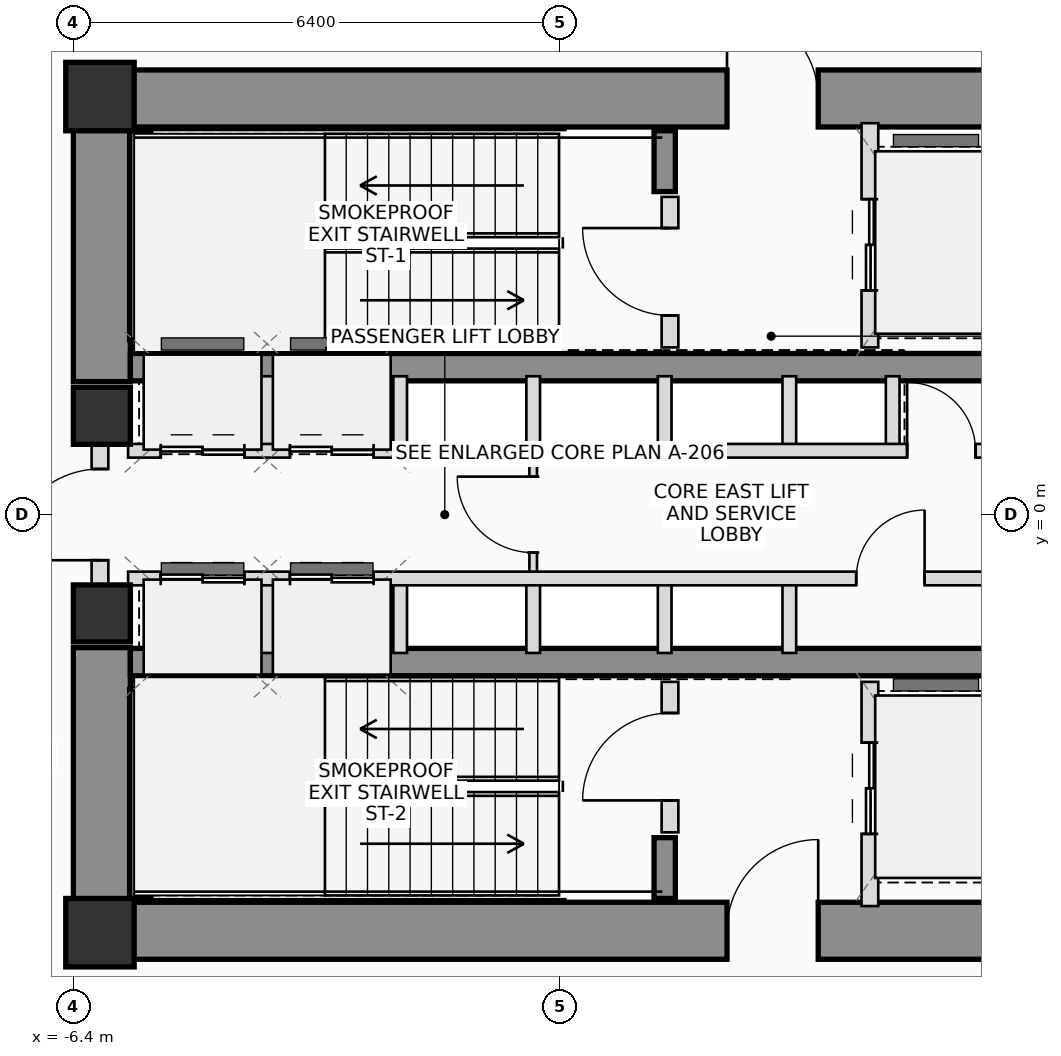
"""IFC4 building model, lengths in metres.
Left out: names, types, materials, properties, quantities, classifications, styles, units other than length and angle.
Written with IfcOpenShell. Run it as: python <this file> out.ifc"""

import sys

from ifc_helpers import new_model, si_unit, direction, frame, frame_2d, origin, origin_2d, place, context, subcontext, project, spatial, rectangle, extrude, source, transform, mapped, element, fill, save


model = new_model("IFC4")
c1 = context("Model", 3, precision=1e-05, world=origin(), true_north=direction((0.0, 1.0)))
c2 = subcontext(c1, "Body", "Model", "MODEL_VIEW")
j1 = project(units=[si_unit("LENGTHUNIT", "METRE"), si_unit("PLANEANGLEUNIT", "RADIAN")], contexts=[c1])
p1 = place(None, origin())
s1 = spatial("IfcSite", under=j1, at=p1, CompositionType="ELEMENT")
p2 = place(p1, origin())
s2 = spatial("IfcBuilding", under=s1, at=p2, CompositionType="ELEMENT")
p3 = place(p2, frame((0.0, 0.0, 54.8)))
s3 = spatial("IfcBuildingStorey", under=s2, at=p3, CompositionType="ELEMENT", Elevation=54.8)
m1 = source(origin(), c2, "Body", "SweptSolid", [
    extrude(rectangle(XDim=0.9, YDim=0.9, at=origin_2d()), origin(), (0.0, 0.0, 1.0), 3.75),
])
for number, where, z_axis, x_axis in (
    (1, (-6.05, -5.5, 0.0), (0.0, 0.0, 1.0), (1.0, 0.0, 0.0)),
    (2, (-6.05, 5.5, 0.0), (0.0, 0.0, 1.0), (1.0, 0.0, 0.0)),
):
    element("IfcColumn", number, at=place(p3, frame(where, z_axis=z_axis, x_axis=x_axis)), inside=s3, PredefinedType="COLUMN", context=c2, shape_type="MappedRepresentation", body=[
        mapped(m1, transform((0.0, 0.0, 0.0), scale=1.0)),
    ])
p4 = place(p3, frame((-6.4, 5.475, 0.0), z_axis=(0.0, 0.0, 1.0), x_axis=(1.0, 0.0, 0.0)))
e3 = element("IfcWall", 3, at=p4, inside=s3, PredefinedType="SHEAR", context=c2, shape_type="SweptSolid", body=[
    extrude(rectangle(XDim=12.8, YDim=0.75, at=frame_2d((6.4, 0.0))), origin(), (0.0, 0.0, 1.0), 3.75),
])
p5 = place(p4, frame((8.6, 0.0, 0.0)))
e4 = element("IfcOpeningElement", 4, at=p5, cuts=e3, PredefinedType="OPENING", context=c2, shape_type="SweptSolid", body=[
    extrude(rectangle(XDim=1.2, YDim=2.2, at=frame_2d((0.6, 1.1))), frame((0.0, 0.385, 0.0), z_axis=(0.0, -1.0, 0.0), x_axis=(1.0, 0.0, 0.0)), (0.0, 0.0, 1.0), 0.77),
])
p6 = place(p3, frame((-6.4, -5.475, 0.0), z_axis=(0.0, 0.0, 1.0), x_axis=(1.0, 0.0, 0.0)))
e5 = element("IfcWall", 5, at=p6, inside=s3, PredefinedType="SHEAR", context=c2, shape_type="SweptSolid", body=[
    extrude(rectangle(XDim=12.8, YDim=0.75, at=frame_2d((6.4, 0.0))), origin(), (0.0, 0.0, 1.0), 3.75),
])
p7 = place(p6, frame((8.6, 0.0, 0.0)))
e6 = element("IfcOpeningElement", 6, at=p7, cuts=e5, PredefinedType="OPENING", context=c2, shape_type="SweptSolid", body=[
    extrude(rectangle(XDim=1.2, YDim=2.2, at=frame_2d((0.6, 1.1))), frame((0.0, 0.385, 0.0), z_axis=(0.0, -1.0, 0.0), x_axis=(1.0, 0.0, 0.0)), (0.0, 0.0, 1.0), 0.77),
])
for number, where, z_axis, x_axis in (
    (7, (-6.025, -5.1, 0.0), (0.0, 0.0, 1.0), (0.0, 1.0, 0.0)),
    (8, (-6.025, 1.75, 0.0), (0.0, 0.0, 1.0), (0.0, 1.0, 0.0)),
):
    element("IfcWall", number, at=place(p3, frame(where, z_axis=z_axis, x_axis=x_axis)), inside=s3, PredefinedType="SHEAR", context=c2, shape_type="SweptSolid", body=[
        extrude(rectangle(XDim=3.35, YDim=0.75, at=frame_2d((1.675, 0.0))), origin(), (0.0, 0.0, 1.0), 3.75),
    ])
for number, where, z_axis, x_axis in (
    (9, (-5.65, 1.94, 0.0), (0.0, 0.0, 1.0), (1.0, 0.0, 0.0)),
    (10, (-5.65, -1.94, 0.0), (0.0, 0.0, 1.0), (1.0, 0.0, 0.0)),
):
    element("IfcWall", number, at=place(p3, frame(where, z_axis=z_axis, x_axis=x_axis)), inside=s3, PredefinedType="SHEAR", context=c2, shape_type="SweptSolid", body=[
        extrude(rectangle(XDim=11.3, YDim=0.36, at=frame_2d((5.65, 0.0))), origin(), (0.0, 0.0, 1.0), 3.75),
    ])
p8 = place(p3, frame((-5.52, 2.3, 0.0), z_axis=(0.0, 0.0, 1.0), x_axis=(0.0, 1.0, 0.0)))
e11 = element("IfcWall", 11, at=p8, inside=s3, PredefinedType="SHEAR", context=c2, shape_type="SweptSolid", body=[
    extrude(rectangle(XDim=2.75, YDim=0.28, at=frame_2d((1.375, 0.0))), origin(), (0.0, 0.0, 1.0), 3.75),
])
p9 = place(p3, frame((1.38, 4.25, 0.0), z_axis=(0.0, 0.0, 1.0), x_axis=(0.0, 1.0, 0.0)))
e12 = element("IfcWall", 12, at=p9, inside=s3, PredefinedType="SHEAR", context=c2, shape_type="SweptSolid", body=[
    extrude(rectangle(XDim=0.8, YDim=0.28, at=frame_2d((0.4, 0.0))), origin(), (0.0, 0.0, 1.0), 3.75),
])
p10 = place(p3, frame((-5.52, -5.05, 0.0), z_axis=(0.0, 0.0, 1.0), x_axis=(0.0, 1.0, 0.0)))
e13 = element("IfcWall", 13, at=p10, inside=s3, PredefinedType="SHEAR", context=c2, shape_type="SweptSolid", body=[
    extrude(rectangle(XDim=2.75, YDim=0.28, at=frame_2d((1.375, 0.0))), origin(), (0.0, 0.0, 1.0), 3.75),
])
p11 = place(p3, frame((1.38, -5.05, 0.0), z_axis=(0.0, 0.0, 1.0), x_axis=(0.0, 1.0, 0.0)))
e14 = element("IfcWall", 14, at=p11, inside=s3, PredefinedType="SHEAR", context=c2, shape_type="SweptSolid", body=[
    extrude(rectangle(XDim=0.8, YDim=0.28, at=frame_2d((0.4, 0.0))), origin(), (0.0, 0.0, 1.0), 3.75),
])
m2 = source(origin(), c2, "Body", "SweptSolid", [
    extrude(rectangle(XDim=0.75, YDim=0.75, at=origin_2d()), origin(), (0.0, 0.0, 1.0), 3.75),
])
for number, where, z_axis, x_axis in (
    (15, (-6.025, -1.3, 0.0), (0.0, 0.0, 1.0), (1.0, 0.0, 0.0)),
    (16, (-6.025, 1.3, 0.0), (0.0, 0.0, 1.0), (1.0, 0.0, 0.0)),
):
    element("IfcColumn", number, at=place(p3, frame(where, z_axis=z_axis, x_axis=x_axis)), inside=s3, PredefinedType="COLUMN", context=c2, shape_type="MappedRepresentation", body=[
        mapped(m2, transform((0.0, 0.0, 0.0), scale=1.0)),
    ])
p12 = place(p3, frame((-6.05, -0.95, 0.0), z_axis=(0.0, 0.0, 1.0), x_axis=(0.0, 1.0, 0.0)))
e17 = element("IfcWall", 17, at=p12, inside=s3, PredefinedType="PLUMBINGWALL", context=c2, shape_type="SweptSolid", body=[
    extrude(rectangle(XDim=1.9, YDim=0.22, at=frame_2d((0.95, 0.0))), origin(), (0.0, 0.0, 1.0), 2.525),
])
p13 = place(p12, frame((0.35, 0.0, 0.0)))
e18 = element("IfcOpeningElement", 18, at=p13, cuts=e17, PredefinedType="OPENING", context=c2, shape_type="SweptSolid", body=[
    extrude(rectangle(XDim=1.2, YDim=2.2, at=frame_2d((0.6, 1.1))), frame((0.0, 0.12, 0.0), z_axis=(0.0, -1.0, 0.0), x_axis=(1.0, 0.0, 0.0)), (0.0, 0.0, 1.0), 0.24),
])
p14 = place(p3, frame((1.45, 2.2, 0.0), z_axis=(0.0, 0.0, 1.0), x_axis=(0.0, 1.0, 0.0)))
e19 = element("IfcWall", 19, at=p14, inside=s3, PredefinedType="PLUMBINGWALL", context=c2, shape_type="SweptSolid", body=[
    extrude(rectangle(XDim=1.98, YDim=0.22, at=frame_2d((0.99, 0.0))), origin(), (0.0, 0.0, 1.0), 3.545),
])
p15 = place(p14, frame((0.42, 0.0, 0.0)))
e20 = element("IfcOpeningElement", 20, at=p15, cuts=e19, PredefinedType="OPENING", context=c2, shape_type="SweptSolid", body=[
    extrude(rectangle(XDim=1.15, YDim=2.15, at=frame_2d((0.575, 1.075))), frame((0.0, 0.12, 0.0), z_axis=(0.0, -1.0, 0.0), x_axis=(1.0, 0.0, 0.0)), (0.0, 0.0, 1.0), 0.24),
])
p16 = place(p3, frame((4.08, 2.2, 0.0), z_axis=(0.0, 0.0, 1.0), x_axis=(0.0, 1.0, 0.0)))
e21 = element("IfcWall", 21, at=p16, inside=s3, PredefinedType="PLUMBINGWALL", context=c2, shape_type="SweptSolid", body=[
    extrude(rectangle(XDim=2.95, YDim=0.22, at=frame_2d((1.475, 0.0))), origin(), (0.0, 0.0, 1.0), 3.545),
])
p17 = place(p16, frame((0.75, 0.0, 0.0)))
e22 = element("IfcOpeningElement", 22, at=p17, cuts=e21, PredefinedType="OPENING", context=c2, shape_type="SweptSolid", body=[
    extrude(rectangle(XDim=1.2, YDim=2.25, at=frame_2d((0.6, 1.125))), frame((0.0, 0.12, 0.0), z_axis=(0.0, -1.0, 0.0), x_axis=(1.0, 0.0, 0.0)), (0.0, 0.0, 1.0), 0.24),
])
p18 = place(p3, frame((1.45, -4.18, 0.0), z_axis=(0.0, 0.0, 1.0), x_axis=(0.0, 1.0, 0.0)))
e23 = element("IfcWall", 23, at=p18, inside=s3, PredefinedType="PLUMBINGWALL", context=c2, shape_type="SweptSolid", body=[
    extrude(rectangle(XDim=1.98, YDim=0.22, at=frame_2d((0.99, 0.0))), origin(), (0.0, 0.0, 1.0), 3.545),
])
p19 = place(p18, frame((0.42, 0.0, 0.0)))
e24 = element("IfcOpeningElement", 24, at=p19, cuts=e23, PredefinedType="OPENING", context=c2, shape_type="SweptSolid", body=[
    extrude(rectangle(XDim=1.15, YDim=2.15, at=frame_2d((0.575, 1.075))), frame((0.0, 0.12, 0.0), z_axis=(0.0, -1.0, 0.0), x_axis=(1.0, 0.0, 0.0)), (0.0, 0.0, 1.0), 0.24),
])
p20 = place(p3, frame((4.08, -5.15, 0.0), z_axis=(0.0, 0.0, 1.0), x_axis=(0.0, 1.0, 0.0)))
e25 = element("IfcWall", 25, at=p20, inside=s3, PredefinedType="PLUMBINGWALL", context=c2, shape_type="SweptSolid", body=[
    extrude(rectangle(XDim=2.95, YDim=0.22, at=frame_2d((1.475, 0.0))), origin(), (0.0, 0.0, 1.0), 3.545),
])
p21 = place(p20, frame((0.95, 0.0, 0.0)))
e26 = element("IfcOpeningElement", 26, at=p21, cuts=e25, PredefinedType="OPENING", context=c2, shape_type="SweptSolid", body=[
    extrude(rectangle(XDim=1.2, YDim=2.25, at=frame_2d((0.6, 1.125))), frame((0.0, 0.12, 0.0), z_axis=(0.0, -1.0, 0.0), x_axis=(1.0, 0.0, 0.0)), (0.0, 0.0, 1.0), 0.24),
])
p22 = place(p3, frame((-0.35, -0.84, 0.0), z_axis=(0.0, 0.0, 1.0), x_axis=(0.0, 1.0, 0.0)))
e27 = element("IfcWall", 27, at=p22, inside=s3, PredefinedType="PARTITIONING", context=c2, shape_type="SweptSolid", body=[
    extrude(rectangle(XDim=1.68, YDim=0.1, at=frame_2d((0.84, 0.0))), origin(), (0.0, 0.0, 1.0), 3.545),
])
p23 = place(p22, frame((0.34, 0.0, 0.0)))
e28 = element("IfcOpeningElement", 28, at=p23, cuts=e27, PredefinedType="OPENING", context=c2, shape_type="SweptSolid", body=[
    extrude(rectangle(XDim=1.0, YDim=2.25, at=frame_2d((0.5, 1.125))), frame((0.0, 0.06, 0.0), z_axis=(0.0, -1.0, 0.0), x_axis=(1.0, 0.0, 0.0)), (0.0, 0.0, 1.0), 0.12),
])
for number, where, z_axis, x_axis in (
    (29, (-3.85, 0.84, 0.0), (0.0, 0.0, 1.0), (0.0, 1.0, 0.0)),
    (30, (-3.85, -1.82, 0.0), (0.0, 0.0, 1.0), (0.0, 1.0, 0.0)),
    (31, (-2.1, 0.84, 0.0), (0.0, 0.0, 1.0), (0.0, 1.0, 0.0)),
    (32, (-2.1, -1.82, 0.0), (0.0, 0.0, 1.0), (0.0, 1.0, 0.0)),
    (33, (-0.35, 0.84, 0.0), (0.0, 0.0, 1.0), (0.0, 1.0, 0.0)),
    (34, (-0.35, -1.82, 0.0), (0.0, 0.0, 1.0), (0.0, 1.0, 0.0)),
    (35, (1.38, 0.84, 0.0), (0.0, 0.0, 1.0), (0.0, 1.0, 0.0)),
    (36, (1.38, -1.82, 0.0), (0.0, 0.0, 1.0), (0.0, 1.0, 0.0)),
    (37, (3.02, 0.84, 0.0), (0.0, 0.0, 1.0), (0.0, 1.0, 0.0)),
    (38, (4.38, 0.84, 0.0), (0.0, 0.0, 1.0), (0.0, 1.0, 0.0)),
    (39, (3.02, -1.82, 0.0), (0.0, 0.0, 1.0), (0.0, 1.0, 0.0)),
):
    element("IfcWall", number, at=place(p3, frame(where, z_axis=z_axis, x_axis=x_axis)), inside=s3, PredefinedType="PLUMBINGWALL", context=c2, shape_type="SweptSolid", body=[
        extrude(rectangle(XDim=0.98, YDim=0.18, at=frame_2d((0.49, 0.0))), origin(), (0.0, 0.0, 1.0), 3.545),
    ])
p24 = place(p3, frame((-5.68, 0.84, 0.0), z_axis=(0.0, 0.0, 1.0), x_axis=(1.0, 0.0, 0.0)))
e40 = element("IfcWall", 40, at=p24, inside=s3, PredefinedType="PLUMBINGWALL", context=c2, shape_type="SweptSolid", body=[
    extrude(rectangle(XDim=11.33, YDim=0.18, at=frame_2d((5.665, 0.0))), origin(), (0.0, 0.0, 1.0), 3.545),
])
p25 = place(p24, frame((0.43, 0.0, 0.0)))
e41 = element("IfcOpeningElement", 41, at=p25, cuts=e40, PredefinedType="OPENING", context=c2, shape_type="SweptSolid", body=[
    extrude(rectangle(XDim=1.1, YDim=2.2, at=frame_2d((0.55, 1.1))), frame((0.0, 0.1, 0.0), z_axis=(0.0, -1.0, 0.0), x_axis=(1.0, 0.0, 0.0)), (0.0, 0.0, 1.0), 0.2),
])
p26 = place(p24, frame((2.13, 0.0, 0.0)))
e42 = element("IfcOpeningElement", 42, at=p26, cuts=e40, PredefinedType="OPENING", context=c2, shape_type="SweptSolid", body=[
    extrude(rectangle(XDim=1.1, YDim=2.2, at=frame_2d((0.55, 1.1))), frame((0.0, 0.1, 0.0), z_axis=(0.0, -1.0, 0.0), x_axis=(1.0, 0.0, 0.0)), (0.0, 0.0, 1.0), 0.2),
])
p27 = place(p24, frame((10.25, 0.0, 0.0)))
e43 = element("IfcOpeningElement", 43, at=p27, cuts=e40, PredefinedType="OPENING", context=c2, shape_type="SweptSolid", body=[
    extrude(rectangle(XDim=0.9, YDim=2.05, at=frame_2d((0.45, 1.025))), frame((0.0, 0.1, 0.0), z_axis=(0.0, -1.0, 0.0), x_axis=(1.0, 0.0, 0.0)), (0.0, 0.0, 1.0), 0.2),
])
p28 = place(p3, frame((-5.68, -0.84, 0.0), z_axis=(0.0, 0.0, 1.0), x_axis=(1.0, 0.0, 0.0)))
e44 = element("IfcWall", 44, at=p28, inside=s3, PredefinedType="PLUMBINGWALL", context=c2, shape_type="SweptSolid", body=[
    extrude(rectangle(XDim=11.33, YDim=0.18, at=frame_2d((5.665, 0.0))), origin(), (0.0, 0.0, 1.0), 3.545),
])
p29 = place(p28, frame((0.43, 0.0, 0.0)))
e45 = element("IfcOpeningElement", 45, at=p29, cuts=e44, PredefinedType="OPENING", context=c2, shape_type="SweptSolid", body=[
    extrude(rectangle(XDim=1.1, YDim=2.2, at=frame_2d((0.55, 1.1))), frame((0.0, 0.1, 0.0), z_axis=(0.0, -1.0, 0.0), x_axis=(1.0, 0.0, 0.0)), (0.0, 0.0, 1.0), 0.2),
])
p30 = place(p28, frame((2.13, 0.0, 0.0)))
e46 = element("IfcOpeningElement", 46, at=p30, cuts=e44, PredefinedType="OPENING", context=c2, shape_type="SweptSolid", body=[
    extrude(rectangle(XDim=1.1, YDim=2.2, at=frame_2d((0.55, 1.1))), frame((0.0, 0.1, 0.0), z_axis=(0.0, -1.0, 0.0), x_axis=(1.0, 0.0, 0.0)), (0.0, 0.0, 1.0), 0.2),
])
p31 = place(p28, frame((9.58, 0.0, 0.0)))
e47 = element("IfcOpeningElement", 47, at=p31, cuts=e44, PredefinedType="OPENING", context=c2, shape_type="SweptSolid", body=[
    extrude(rectangle(XDim=0.9, YDim=2.05, at=frame_2d((0.45, 1.025))), frame((0.0, 0.1, 0.0), z_axis=(0.0, -1.0, 0.0), x_axis=(1.0, 0.0, 0.0)), (0.0, 0.0, 1.0), 0.2),
])
p32 = place(p5, origin())
e48 = element("IfcDoor", 48, at=p32, inside=s3, OperationType="SINGLE_SWING_LEFT", PredefinedType="DOOR", context=c2, shape_type="SweptSolid", body=[
    extrude(rectangle(XDim=1.2, YDim=2.2, at=frame_2d((0.6, 1.1))), frame((0.0, 0.025, 0.0), z_axis=(0.0, -1.0, 0.0), x_axis=(1.0, 0.0, 0.0)), (0.0, 0.0, 1.0), 0.05),
])
fill(e4, e48)
p33 = place(p7, origin())
e49 = element("IfcDoor", 49, at=p33, inside=s3, OperationType="SINGLE_SWING_RIGHT", PredefinedType="DOOR", context=c2, shape_type="SweptSolid", body=[
    extrude(rectangle(XDim=1.2, YDim=2.2, at=frame_2d((0.6, 1.1))), frame((0.0, 0.025, 0.0), z_axis=(0.0, -1.0, 0.0), x_axis=(1.0, 0.0, 0.0)), (0.0, 0.0, 1.0), 0.05),
])
fill(e6, e49)
p34 = place(p13, origin())
e50 = element("IfcDoor", 50, at=p34, inside=s3, OperationType="SINGLE_SWING_LEFT", PredefinedType="DOOR", context=c2, shape_type="SweptSolid", body=[
    extrude(rectangle(XDim=1.2, YDim=2.2, at=frame_2d((0.6, 1.1))), frame((0.0, 0.025, 0.0), z_axis=(0.0, -1.0, 0.0), x_axis=(1.0, 0.0, 0.0)), (0.0, 0.0, 1.0), 0.05),
])
fill(e18, e50)
p35 = place(p15, origin())
e51 = element("IfcDoor", 51, at=p35, inside=s3, OperationType="SINGLE_SWING_RIGHT", PredefinedType="DOOR", context=c2, shape_type="SweptSolid", body=[
    extrude(rectangle(XDim=1.15, YDim=2.15, at=frame_2d((0.575, 1.075))), frame((0.0, 0.025, 0.0), z_axis=(0.0, -1.0, 0.0), x_axis=(1.0, 0.0, 0.0)), (0.0, 0.0, 1.0), 0.05),
])
fill(e20, e51)
p36 = place(p17, origin())
e52 = element("IfcDoor", 52, at=p36, inside=s3, OperationType="DOUBLE_DOOR_SLIDING", PredefinedType="DOOR", context=c2, shape_type="SweptSolid", body=[
    extrude(rectangle(XDim=1.2, YDim=2.25, at=frame_2d((0.6, 1.125))), frame((0.0, 0.025, 0.0), z_axis=(0.0, -1.0, 0.0), x_axis=(1.0, 0.0, 0.0)), (0.0, 0.0, 1.0), 0.05),
])
fill(e22, e52)
p37 = place(p19, origin())
e53 = element("IfcDoor", 53, at=p37, inside=s3, OperationType="SINGLE_SWING_LEFT", PredefinedType="DOOR", context=c2, shape_type="SweptSolid", body=[
    extrude(rectangle(XDim=1.15, YDim=2.15, at=frame_2d((0.575, 1.075))), frame((0.0, 0.025, 0.0), z_axis=(0.0, -1.0, 0.0), x_axis=(1.0, 0.0, 0.0)), (0.0, 0.0, 1.0), 0.05),
])
fill(e24, e53)
p38 = place(p21, origin())
e54 = element("IfcDoor", 54, at=p38, inside=s3, OperationType="DOUBLE_DOOR_SLIDING", PredefinedType="DOOR", context=c2, shape_type="SweptSolid", body=[
    extrude(rectangle(XDim=1.2, YDim=2.25, at=frame_2d((0.6, 1.125))), frame((0.0, 0.025, 0.0), z_axis=(0.0, -1.0, 0.0), x_axis=(1.0, 0.0, 0.0)), (0.0, 0.0, 1.0), 0.05),
])
fill(e26, e54)
p39 = place(p23, origin())
e55 = element("IfcDoor", 55, at=p39, inside=s3, OperationType="SINGLE_SWING_RIGHT", PredefinedType="DOOR", context=c2, shape_type="SweptSolid", body=[
    extrude(rectangle(XDim=1.0, YDim=2.25, at=frame_2d((0.5, 1.125))), frame((0.0, 0.025, 0.0), z_axis=(0.0, -1.0, 0.0), x_axis=(1.0, 0.0, 0.0)), (0.0, 0.0, 1.0), 0.05),
])
fill(e28, e55)
p40 = place(p25, origin())
e56 = element("IfcDoor", 56, at=p40, inside=s3, OperationType="DOUBLE_DOOR_SLIDING", PredefinedType="DOOR", context=c2, shape_type="SweptSolid", body=[
    extrude(rectangle(XDim=1.1, YDim=2.2, at=frame_2d((0.55, 1.1))), frame((0.0, 0.025, 0.0), z_axis=(0.0, -1.0, 0.0), x_axis=(1.0, 0.0, 0.0)), (0.0, 0.0, 1.0), 0.05),
])
fill(e41, e56)
p41 = place(p26, origin())
e57 = element("IfcDoor", 57, at=p41, inside=s3, OperationType="DOUBLE_DOOR_SLIDING", PredefinedType="DOOR", context=c2, shape_type="SweptSolid", body=[
    extrude(rectangle(XDim=1.1, YDim=2.2, at=frame_2d((0.55, 1.1))), frame((0.0, 0.025, 0.0), z_axis=(0.0, -1.0, 0.0), x_axis=(1.0, 0.0, 0.0)), (0.0, 0.0, 1.0), 0.05),
])
fill(e42, e57)
p42 = place(p27, origin())
e58 = element("IfcDoor", 58, at=p42, inside=s3, OperationType="SINGLE_SWING_LEFT", PredefinedType="DOOR", context=c2, shape_type="SweptSolid", body=[
    extrude(rectangle(XDim=0.9, YDim=2.05, at=frame_2d((0.45, 1.025))), frame((0.0, 0.025, 0.0), z_axis=(0.0, -1.0, 0.0), x_axis=(1.0, 0.0, 0.0)), (0.0, 0.0, 1.0), 0.05),
])
fill(e43, e58)
p43 = place(p29, origin())
e59 = element("IfcDoor", 59, at=p43, inside=s3, OperationType="DOUBLE_DOOR_SLIDING", PredefinedType="DOOR", context=c2, shape_type="SweptSolid", body=[
    extrude(rectangle(XDim=1.1, YDim=2.2, at=frame_2d((0.55, 1.1))), frame((0.0, 0.025, 0.0), z_axis=(0.0, -1.0, 0.0), x_axis=(1.0, 0.0, 0.0)), (0.0, 0.0, 1.0), 0.05),
])
fill(e45, e59)
p44 = place(p30, origin())
e60 = element("IfcDoor", 60, at=p44, inside=s3, OperationType="DOUBLE_DOOR_SLIDING", PredefinedType="DOOR", context=c2, shape_type="SweptSolid", body=[
    extrude(rectangle(XDim=1.1, YDim=2.2, at=frame_2d((0.55, 1.1))), frame((0.0, 0.025, 0.0), z_axis=(0.0, -1.0, 0.0), x_axis=(1.0, 0.0, 0.0)), (0.0, 0.0, 1.0), 0.05),
])
fill(e46, e60)
p45 = place(p31, origin())
e61 = element("IfcDoor", 61, at=p45, inside=s3, OperationType="SINGLE_SWING_RIGHT", PredefinedType="DOOR", context=c2, shape_type="SweptSolid", body=[
    extrude(rectangle(XDim=0.9, YDim=2.05, at=frame_2d((0.45, 1.025))), frame((0.0, 0.025, 0.0), z_axis=(0.0, -1.0, 0.0), x_axis=(1.0, 0.0, 0.0)), (0.0, 0.0, 1.0), 0.05),
])
fill(e47, e61)
save(model, sys.argv[1])
